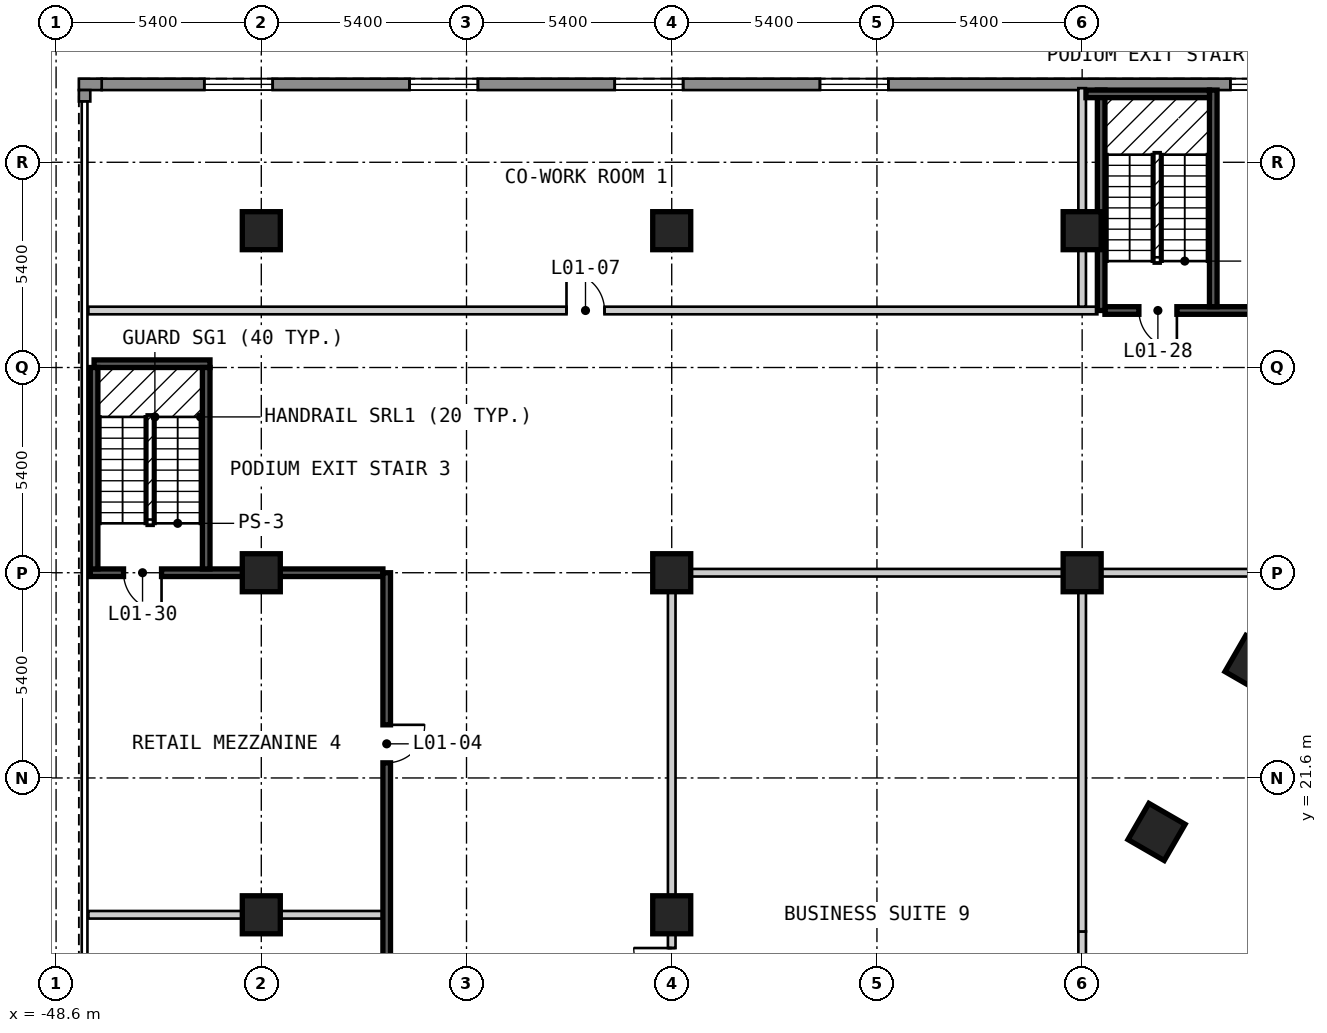
"""IFC4 building model, lengths in metres.
Left out: names, types, materials, properties, quantities, classifications, styles, units other than length and angle.
Written with IfcOpenShell. Run it as: python <this file> out.ifc"""

import sys

from ifc_helpers import new_model, si_unit, direction, frame, frame_2d, origin, origin_2d, place, context, subcontext, project, spatial, rectangle, extrude, element, fill, save


model = new_model("IFC4")
c1 = context("Model", 3, precision=1e-05, world=origin(), true_north=direction((0.0, 1.0)))
c2 = subcontext(c1, "Body", "Model", "MODEL_VIEW")
j1 = project(units=[si_unit("LENGTHUNIT", "METRE"), si_unit("PLANEANGLEUNIT", "RADIAN")], contexts=[c1])
p1 = place(None, origin())
s1 = spatial("IfcSite", under=j1, at=p1, CompositionType="ELEMENT")
p2 = place(p1, origin())
s2 = spatial("IfcBuilding", under=s1, at=p2, CompositionType="ELEMENT")
p3 = place(p2, frame((0.0, 0.0, 5.0)))
s3 = spatial("IfcBuildingStorey", under=s2, at=p3, CompositionType="ELEMENT", Elevation=5.0)
for number, where, z_axis, x_axis in (
    (1, (-17.09, 24.6, 0.0), (0.0, 0.0, 1.0), (-0.5, -0.866, 0.0)),
    (2, (-19.642, 20.18, 0.0), (0.0, 0.0, 1.0), (-0.5, -0.866, 0.0)),
):
    element("IfcColumn", number, at=place(p3, frame(where, z_axis=z_axis, x_axis=x_axis)), inside=s3, PredefinedType="COLUMN", context=c2, shape_type="SweptSolid", body=[
        extrude(rectangle(XDim=1.1, YDim=1.1, at=origin_2d()), origin(), (0.0, 0.0, 1.0), 4.0),
    ])
for number, where, z_axis, x_axis in (
    (3, (-43.2, 18.0, 0.0), (0.0, 0.0, 1.0), (1.0, 0.0, 0.0)),
    (4, (-43.2, 27.0, 0.0), (0.0, 0.0, 1.0), (1.0, 0.0, 0.0)),
    (5, (-43.2, 36.0, 0.0), (0.0, 0.0, 1.0), (1.0, 0.0, 0.0)),
    (6, (-32.4, 18.0, 0.0), (0.0, 0.0, 1.0), (1.0, 0.0, 0.0)),
    (7, (-32.4, 27.0, 0.0), (0.0, 0.0, 1.0), (1.0, 0.0, 0.0)),
    (8, (-32.4, 36.0, 0.0), (0.0, 0.0, 1.0), (1.0, 0.0, 0.0)),
    (9, (-21.6, 27.0, 0.0), (0.0, 0.0, 1.0), (1.0, 0.0, 0.0)),
    (10, (-21.6, 36.0, 0.0), (0.0, 0.0, 1.0), (1.0, 0.0, 0.0)),
):
    element("IfcColumn", number, at=place(p3, frame(where, z_axis=z_axis, x_axis=x_axis)), inside=s3, PredefinedType="COLUMN", context=c2, shape_type="SweptSolid", body=[
        extrude(rectangle(XDim=1.0, YDim=1.0, at=origin_2d()), origin(), (0.0, 0.0, 1.0), 4.0),
    ])
p4 = place(p3, frame((47.4, 39.85, 0.0), z_axis=(0.0, 0.0, 1.0), x_axis=(-1.0, 0.0, 0.0)))
e11 = element("IfcWall", 11, at=p4, inside=s3, PredefinedType="SOLIDWALL", context=c2, shape_type="SweptSolid", body=[
    extrude(rectangle(XDim=94.8, YDim=0.3, at=frame_2d((47.4, 0.0))), origin(), (0.0, 0.0, 1.0), 3.5),
])
p5 = place(p4, frame((3.9, 0.0, 0.9)))
e12 = element("IfcOpeningElement", 12, at=p5, cuts=e11, PredefinedType="OPENING", context=c2, shape_type="SweptSolid", body=[
    extrude(rectangle(XDim=1.8, YDim=2.4, at=frame_2d((0.9, 1.2))), frame((0.0, 0.16, 0.0), z_axis=(0.0, -1.0, 0.0), x_axis=(1.0, 0.0, 0.0)), (0.0, 0.0, 1.0), 0.32),
])
p6 = place(p4, frame((9.3, 0.0, 0.9)))
e13 = element("IfcOpeningElement", 13, at=p6, cuts=e11, PredefinedType="OPENING", context=c2, shape_type="SweptSolid", body=[
    extrude(rectangle(XDim=1.8, YDim=2.4, at=frame_2d((0.9, 1.2))), frame((0.0, 0.16, 0.0), z_axis=(0.0, -1.0, 0.0), x_axis=(1.0, 0.0, 0.0)), (0.0, 0.0, 1.0), 0.32),
])
p7 = place(p4, frame((14.7, 0.0, 0.9)))
e14 = element("IfcOpeningElement", 14, at=p7, cuts=e11, PredefinedType="OPENING", context=c2, shape_type="SweptSolid", body=[
    extrude(rectangle(XDim=1.8, YDim=2.4, at=frame_2d((0.9, 1.2))), frame((0.0, 0.16, 0.0), z_axis=(0.0, -1.0, 0.0), x_axis=(1.0, 0.0, 0.0)), (0.0, 0.0, 1.0), 0.32),
])
p8 = place(p4, frame((20.1, 0.0, 0.9)))
e15 = element("IfcOpeningElement", 15, at=p8, cuts=e11, PredefinedType="OPENING", context=c2, shape_type="SweptSolid", body=[
    extrude(rectangle(XDim=1.8, YDim=2.4, at=frame_2d((0.9, 1.2))), frame((0.0, 0.16, 0.0), z_axis=(0.0, -1.0, 0.0), x_axis=(1.0, 0.0, 0.0)), (0.0, 0.0, 1.0), 0.32),
])
p9 = place(p4, frame((30.9, 0.0, 0.9)))
e16 = element("IfcOpeningElement", 16, at=p9, cuts=e11, PredefinedType="OPENING", context=c2, shape_type="SweptSolid", body=[
    extrude(rectangle(XDim=1.8, YDim=2.4, at=frame_2d((0.9, 1.2))), frame((0.0, 0.16, 0.0), z_axis=(0.0, -1.0, 0.0), x_axis=(1.0, 0.0, 0.0)), (0.0, 0.0, 1.0), 0.32),
])
p10 = place(p4, frame((36.3, 0.0, 0.9)))
e17 = element("IfcOpeningElement", 17, at=p10, cuts=e11, PredefinedType="OPENING", context=c2, shape_type="SweptSolid", body=[
    extrude(rectangle(XDim=1.8, YDim=2.4, at=frame_2d((0.9, 1.2))), frame((0.0, 0.16, 0.0), z_axis=(0.0, -1.0, 0.0), x_axis=(1.0, 0.0, 0.0)), (0.0, 0.0, 1.0), 0.32),
])
p11 = place(p4, frame((41.7, 0.0, 0.9)))
e18 = element("IfcOpeningElement", 18, at=p11, cuts=e11, PredefinedType="OPENING", context=c2, shape_type="SweptSolid", body=[
    extrude(rectangle(XDim=1.8, YDim=2.4, at=frame_2d((0.9, 1.2))), frame((0.0, 0.16, 0.0), z_axis=(0.0, -1.0, 0.0), x_axis=(1.0, 0.0, 0.0)), (0.0, 0.0, 1.0), 0.32),
])
p12 = place(p4, frame((47.1, 0.0, 0.9)))
e19 = element("IfcOpeningElement", 19, at=p12, cuts=e11, PredefinedType="OPENING", context=c2, shape_type="SweptSolid", body=[
    extrude(rectangle(XDim=1.8, YDim=2.4, at=frame_2d((0.9, 1.2))), frame((0.0, 0.16, 0.0), z_axis=(0.0, -1.0, 0.0), x_axis=(1.0, 0.0, 0.0)), (0.0, 0.0, 1.0), 0.32),
])
p13 = place(p4, frame((52.5, 0.0, 0.9)))
e20 = element("IfcOpeningElement", 20, at=p13, cuts=e11, PredefinedType="OPENING", context=c2, shape_type="SweptSolid", body=[
    extrude(rectangle(XDim=1.8, YDim=2.4, at=frame_2d((0.9, 1.2))), frame((0.0, 0.16, 0.0), z_axis=(0.0, -1.0, 0.0), x_axis=(1.0, 0.0, 0.0)), (0.0, 0.0, 1.0), 0.32),
])
p14 = place(p4, frame((57.9, 0.0, 0.9)))
e21 = element("IfcOpeningElement", 21, at=p14, cuts=e11, PredefinedType="OPENING", context=c2, shape_type="SweptSolid", body=[
    extrude(rectangle(XDim=1.8, YDim=2.4, at=frame_2d((0.9, 1.2))), frame((0.0, 0.16, 0.0), z_axis=(0.0, -1.0, 0.0), x_axis=(1.0, 0.0, 0.0)), (0.0, 0.0, 1.0), 0.32),
])
p15 = place(p4, frame((63.3, 0.0, 0.9)))
e22 = element("IfcOpeningElement", 22, at=p15, cuts=e11, PredefinedType="OPENING", context=c2, shape_type="SweptSolid", body=[
    extrude(rectangle(XDim=1.8, YDim=2.4, at=frame_2d((0.9, 1.2))), frame((0.0, 0.16, 0.0), z_axis=(0.0, -1.0, 0.0), x_axis=(1.0, 0.0, 0.0)), (0.0, 0.0, 1.0), 0.32),
])
p16 = place(p4, frame((74.1, 0.0, 0.9)))
e23 = element("IfcOpeningElement", 23, at=p16, cuts=e11, PredefinedType="OPENING", context=c2, shape_type="SweptSolid", body=[
    extrude(rectangle(XDim=1.8, YDim=2.4, at=frame_2d((0.9, 1.2))), frame((0.0, 0.16, 0.0), z_axis=(0.0, -1.0, 0.0), x_axis=(1.0, 0.0, 0.0)), (0.0, 0.0, 1.0), 0.32),
])
p17 = place(p4, frame((79.5, 0.0, 0.9)))
e24 = element("IfcOpeningElement", 24, at=p17, cuts=e11, PredefinedType="OPENING", context=c2, shape_type="SweptSolid", body=[
    extrude(rectangle(XDim=1.8, YDim=2.4, at=frame_2d((0.9, 1.2))), frame((0.0, 0.16, 0.0), z_axis=(0.0, -1.0, 0.0), x_axis=(1.0, 0.0, 0.0)), (0.0, 0.0, 1.0), 0.32),
])
p18 = place(p4, frame((84.9, 0.0, 0.9)))
e25 = element("IfcOpeningElement", 25, at=p18, cuts=e11, PredefinedType="OPENING", context=c2, shape_type="SweptSolid", body=[
    extrude(rectangle(XDim=1.8, YDim=2.4, at=frame_2d((0.9, 1.2))), frame((0.0, 0.16, 0.0), z_axis=(0.0, -1.0, 0.0), x_axis=(1.0, 0.0, 0.0)), (0.0, 0.0, 1.0), 0.32),
])
p19 = place(p4, frame((90.3, 0.0, 0.9)))
e26 = element("IfcOpeningElement", 26, at=p19, cuts=e11, PredefinedType="OPENING", context=c2, shape_type="SweptSolid", body=[
    extrude(rectangle(XDim=1.8, YDim=2.4, at=frame_2d((0.9, 1.2))), frame((0.0, 0.16, 0.0), z_axis=(0.0, -1.0, 0.0), x_axis=(1.0, 0.0, 0.0)), (0.0, 0.0, 1.0), 0.32),
])
p20 = place(p3, frame((-47.4, 39.85, 0.0), z_axis=(0.0, 0.0, 1.0), x_axis=(-1.0, 0.0, 0.0)))
e27 = element("IfcWall", 27, at=p20, inside=s3, PredefinedType="SOLIDWALL", context=c2, shape_type="SweptSolid", body=[
    extrude(rectangle(XDim=0.6, YDim=0.3, at=frame_2d((0.3, 0.0))), origin(), (0.0, 0.0, 1.0), 3.5),
])
p21 = place(p3, frame((-47.85, 39.7, 0.0), z_axis=(0.0, 0.0, 1.0), x_axis=(0.0, -1.0, 0.0)))
e28 = element("IfcWall", 28, at=p21, inside=s3, PredefinedType="SOLIDWALL", context=c2, shape_type="SweptSolid", body=[
    extrude(rectangle(XDim=0.3, YDim=0.3, at=frame_2d((0.15, 0.0))), origin(), (0.0, 0.0, 1.0), 3.5),
])
p22 = place(p3, frame((-47.75, 18.0, 0.0), z_axis=(0.0, 0.0, 1.0), x_axis=(1.0, 0.0, 0.0)))
e29 = element("IfcWall", 29, at=p22, inside=s3, PredefinedType="PARTITIONING", context=c2, shape_type="SweptSolid", body=[
    extrude(rectangle(XDim=7.75, YDim=0.2, at=frame_2d((3.875, 0.0))), origin(), (0.0, 0.0, 1.0), 3.5),
])
p23 = place(p3, frame((-47.7, 27.0, 0.0), z_axis=(0.0, 0.0, 1.0), x_axis=(1.0, 0.0, 0.0)))
e30 = element("IfcWall", 30, at=p23, inside=s3, PredefinedType="SOLIDWALL", context=c2, shape_type="SweptSolid", body=[
    extrude(rectangle(XDim=7.7, YDim=0.2, at=frame_2d((3.85, 0.0))), origin(), (0.0, 0.0, 1.0), 3.5),
])
p24 = place(p23, frame((0.875, 0.0, 0.0)))
e31 = element("IfcOpeningElement", 31, at=p24, cuts=e30, PredefinedType="OPENING", context=c2, shape_type="SweptSolid", body=[
    extrude(rectangle(XDim=1.0, YDim=2.1, at=frame_2d((0.5, 1.05))), frame((0.0, 0.11, 0.0), z_axis=(0.0, -1.0, 0.0), x_axis=(1.0, 0.0, 0.0)), (0.0, 0.0, 1.0), 0.22),
])
p25 = place(p3, frame((-32.4, 27.0, 0.0), z_axis=(0.0, 0.0, 1.0), x_axis=(1.0, 0.0, 0.0)))
e32 = element("IfcWall", 32, at=p25, inside=s3, PredefinedType="PARTITIONING", context=c2, shape_type="SweptSolid", body=[
    extrude(rectangle(XDim=18.793, YDim=0.2, at=frame_2d((9.396, 0.0))), origin(), (0.0, 0.0, 1.0), 3.5),
])
p26 = place(p3, frame((-47.6, 32.5, 0.0), z_axis=(0.0, 0.0, 1.0), x_axis=(1.0, 0.0, 0.0)))
e33 = element("IfcWall", 33, at=p26, inside=s3, PredefinedType="SOLIDWALL", context=c2, shape_type="SweptSolid", body=[
    extrude(rectangle(XDim=3.05, YDim=0.2, at=frame_2d((1.525, 0.0))), origin(), (0.0, 0.0, 1.0), 3.5),
])
p27 = place(p3, frame((-47.75, 33.9, 0.0), z_axis=(0.0, 0.0, 1.0), x_axis=(1.0, 0.0, 0.0)))
e34 = element("IfcWall", 34, at=p27, inside=s3, PredefinedType="PARTITIONING", context=c2, shape_type="SweptSolid", body=[
    extrude(rectangle(XDim=26.55, YDim=0.2, at=frame_2d((13.275, 0.0))), origin(), (0.0, 0.0, 1.0), 3.5),
])
p28 = place(p27, frame((12.581, 0.0, 0.0)))
e35 = element("IfcOpeningElement", 35, at=p28, cuts=e34, PredefinedType="OPENING", context=c2, shape_type="SweptSolid", body=[
    extrude(rectangle(XDim=1.0, YDim=2.1, at=frame_2d((0.5, 1.05))), frame((0.0, 0.11, 0.0), z_axis=(0.0, -1.0, 0.0), x_axis=(1.0, 0.0, 0.0)), (0.0, 0.0, 1.0), 0.22),
])
p29 = place(p3, frame((-21.0, 33.9, 0.0), z_axis=(0.0, 0.0, 1.0), x_axis=(1.0, 0.0, 0.0)))
e36 = element("IfcWall", 36, at=p29, inside=s3, PredefinedType="SOLIDWALL", context=c2, shape_type="SweptSolid", body=[
    extrude(rectangle(XDim=42.0, YDim=0.2, at=frame_2d((21.0, 0.0))), origin(), (0.0, 0.0, 1.0), 3.5),
])
p30 = place(p29, frame((7.6, 0.0, 0.0)))
e37 = element("IfcOpeningElement", 37, at=p30, cuts=e36, PredefinedType="OPENING", context=c2, shape_type="SweptSolid", body=[
    extrude(rectangle(XDim=1.0, YDim=2.1, at=frame_2d((0.5, 1.05))), frame((0.0, 0.11, 0.0), z_axis=(0.0, -1.0, 0.0), x_axis=(1.0, 0.0, 0.0)), (0.0, 0.0, 1.0), 0.22),
])
p31 = place(p29, frame((25.85, 0.0, 0.0)))
e38 = element("IfcOpeningElement", 38, at=p31, cuts=e36, PredefinedType="OPENING", context=c2, shape_type="SweptSolid", body=[
    extrude(rectangle(XDim=1.0, YDim=2.1, at=frame_2d((0.5, 1.05))), frame((0.0, 0.11, 0.0), z_axis=(0.0, -1.0, 0.0), x_axis=(1.0, 0.0, 0.0)), (0.0, 0.0, 1.0), 0.22),
])
p32 = place(p29, frame((0.893, 0.0, 0.0)))
e39 = element("IfcOpeningElement", 39, at=p32, cuts=e36, PredefinedType="OPENING", context=c2, shape_type="SweptSolid", body=[
    extrude(rectangle(XDim=1.0, YDim=2.1, at=frame_2d((0.5, 1.05))), frame((0.0, 0.11, 0.0), z_axis=(0.0, -1.0, 0.0), x_axis=(1.0, 0.0, 0.0)), (0.0, 0.0, 1.0), 0.22),
])
p33 = place(p29, frame((40.107, 0.0, 0.0)))
e40 = element("IfcOpeningElement", 40, at=p33, cuts=e36, PredefinedType="OPENING", context=c2, shape_type="SweptSolid", body=[
    extrude(rectangle(XDim=1.0, YDim=2.1, at=frame_2d((0.5, 1.05))), frame((0.0, 0.11, 0.0), z_axis=(0.0, -1.0, 0.0), x_axis=(1.0, 0.0, 0.0)), (0.0, 0.0, 1.0), 0.22),
])
p34 = place(p3, frame((-44.65, 27.1, 0.0), z_axis=(0.0, 0.0, 1.0), x_axis=(0.0, 1.0, 0.0)))
e41 = element("IfcWall", 41, at=p34, inside=s3, PredefinedType="SOLIDWALL", context=c2, shape_type="SweptSolid", body=[
    extrude(rectangle(XDim=5.3, YDim=0.2, at=frame_2d((2.65, 0.0))), origin(), (0.0, 0.0, 1.0), 3.5),
])
p35 = place(p3, frame((-39.9, -6.3, 0.0), z_axis=(0.0, 0.0, 1.0), x_axis=(0.0, 1.0, 0.0)))
e42 = element("IfcWall", 42, at=p35, inside=s3, PredefinedType="SOLIDWALL", context=c2, shape_type="SweptSolid", body=[
    extrude(rectangle(XDim=33.3, YDim=0.2, at=frame_2d((16.65, 0.0))), origin(), (0.0, 0.0, 1.0), 3.5),
])
p36 = place(p35, frame((10.302, 0.0, 0.0)))
e43 = element("IfcOpeningElement", 43, at=p36, cuts=e42, PredefinedType="OPENING", context=c2, shape_type="SweptSolid", body=[
    extrude(rectangle(XDim=1.0, YDim=2.1, at=frame_2d((0.5, 1.05))), frame((0.0, 0.11, 0.0), z_axis=(0.0, -1.0, 0.0), x_axis=(1.0, 0.0, 0.0)), (0.0, 0.0, 1.0), 0.22),
])
p37 = place(p35, frame((28.298, 0.0, 0.0)))
e44 = element("IfcOpeningElement", 44, at=p37, cuts=e42, PredefinedType="OPENING", context=c2, shape_type="SweptSolid", body=[
    extrude(rectangle(XDim=1.0, YDim=2.1, at=frame_2d((0.5, 1.05))), frame((0.0, 0.11, 0.0), z_axis=(0.0, -1.0, 0.0), x_axis=(1.0, 0.0, 0.0)), (0.0, 0.0, 1.0), 0.22),
])
p38 = place(p35, frame((19.3, 0.0, 0.0)))
e45 = element("IfcOpeningElement", 45, at=p38, cuts=e42, PredefinedType="OPENING", context=c2, shape_type="SweptSolid", body=[
    extrude(rectangle(XDim=1.0, YDim=2.1, at=frame_2d((0.5, 1.05))), frame((0.0, 0.11, 0.0), z_axis=(0.0, -1.0, 0.0), x_axis=(1.0, 0.0, 0.0)), (0.0, 0.0, 1.0), 0.22),
])
p39 = place(p35, frame((0.45, 0.0, 0.0)))
e46 = element("IfcOpeningElement", 46, at=p39, cuts=e42, PredefinedType="OPENING", context=c2, shape_type="SweptSolid", body=[
    extrude(rectangle(XDim=1.0, YDim=2.1, at=frame_2d((0.5, 1.05))), frame((0.0, 0.11, 0.0), z_axis=(0.0, -1.0, 0.0), x_axis=(1.0, 0.0, 0.0)), (0.0, 0.0, 1.0), 0.22),
])
p40 = place(p3, frame((-32.4, 9.1, 0.0), z_axis=(0.0, 0.0, 1.0), x_axis=(0.0, 1.0, 0.0)))
e47 = element("IfcWall", 47, at=p40, inside=s3, PredefinedType="PARTITIONING", context=c2, shape_type="SweptSolid", body=[
    extrude(rectangle(XDim=17.8, YDim=0.2, at=frame_2d((8.9, 0.0))), origin(), (0.0, 0.0, 1.0), 3.5),
])
p41 = place(p40, frame((8.025, 0.0, 0.0), z_axis=(0.0, 0.0, 1.0), x_axis=(-1.0, 0.0, 0.0)))
e48 = element("IfcOpeningElement", 48, at=p41, cuts=e47, PredefinedType="OPENING", context=c2, shape_type="SweptSolid", body=[
    extrude(rectangle(XDim=1.0, YDim=2.1, at=frame_2d((0.5, 1.05))), frame((0.0, 0.11, 0.0), z_axis=(0.0, -1.0, 0.0), x_axis=(1.0, 0.0, 0.0)), (0.0, 0.0, 1.0), 0.22),
])
p42 = place(p3, frame((-21.6, 16.015, 0.0), z_axis=(0.0, 0.0, 1.0), x_axis=(0.0, 1.0, 0.0)))
e49 = element("IfcWall", 49, at=p42, inside=s3, PredefinedType="PARTITIONING", context=c2, shape_type="SweptSolid", body=[
    extrude(rectangle(XDim=1.546, YDim=0.2, at=frame_2d((0.773, 0.0))), origin(), (0.0, 0.0, 1.0), 2.77),
])
p43 = place(p3, frame((-21.6, 17.561, 0.0), z_axis=(0.0, 0.0, 1.0), x_axis=(0.0, 1.0, 0.0)))
e50 = element("IfcWall", 50, at=p43, inside=s3, PredefinedType="PARTITIONING", context=c2, shape_type="SweptSolid", body=[
    extrude(rectangle(XDim=9.339, YDim=0.2, at=frame_2d((4.669, 0.0))), origin(), (0.0, 0.0, 1.0), 3.5),
])
p44 = place(p3, frame((-21.6, 34.0, 0.0), z_axis=(0.0, 0.0, 1.0), x_axis=(0.0, 1.0, 0.0)))
e51 = element("IfcWall", 51, at=p44, inside=s3, PredefinedType="PARTITIONING", context=c2, shape_type="SweptSolid", body=[
    extrude(rectangle(XDim=5.75, YDim=0.2, at=frame_2d((2.875, 0.0))), origin(), (0.0, 0.0, 1.0), 3.5),
])
p45 = place(p3, frame((-21.1, 33.9, 0.0), z_axis=(0.0, 0.0, 1.0), x_axis=(0.0, 1.0, 0.0)))
e52 = element("IfcWall", 52, at=p45, inside=s3, PredefinedType="SOLIDWALL", context=c2, shape_type="SweptSolid", body=[
    extrude(rectangle(XDim=5.8, YDim=0.2, at=frame_2d((2.9, 0.0))), origin(), (0.0, 0.0, 1.0), 3.5),
])
p46 = place(p3, frame((-18.15, 34.0, 0.0), z_axis=(0.0, 0.0, 1.0), x_axis=(0.0, 1.0, 0.0)))
e53 = element("IfcWall", 53, at=p46, inside=s3, PredefinedType="SOLIDWALL", context=c2, shape_type="SweptSolid", body=[
    extrude(rectangle(XDim=5.7, YDim=0.2, at=frame_2d((2.85, 0.0))), origin(), (0.0, 0.0, 1.0), 3.5),
])
p47 = place(p3, frame((-21.5, 39.6, 0.0), z_axis=(0.0, 0.0, 1.0), x_axis=(1.0, 0.0, 0.0)))
e54 = element("IfcWall", 54, at=p47, inside=s3, PredefinedType="SOLIDWALL", context=c2, shape_type="SweptSolid", body=[
    extrude(rectangle(XDim=3.25, YDim=0.2, at=frame_2d((1.625, 0.0))), origin(), (0.0, 0.0, 1.0), 3.5),
])
p48 = place(p3, frame((-47.6, 27.1, 0.0), z_axis=(0.0, 0.0, 1.0), x_axis=(0.0, 1.0, 0.0)))
e55 = element("IfcWall", 55, at=p48, inside=s3, PredefinedType="SOLIDWALL", context=c2, shape_type="SweptSolid", body=[
    extrude(rectangle(XDim=5.3, YDim=0.2, at=frame_2d((2.65, 0.0))), origin(), (0.0, 0.0, 1.0), 3.5),
])
p49 = place(p15, origin())
e56 = element("IfcWindow", 56, at=p49, inside=s3, PartitioningType="SINGLE_PANEL", PredefinedType="WINDOW", context=c2, shape_type="SweptSolid", body=[
    extrude(rectangle(XDim=1.8, YDim=2.4, at=frame_2d((0.9, 1.2))), frame((0.0, 0.03, 0.0), z_axis=(0.0, -1.0, 0.0), x_axis=(1.0, 0.0, 0.0)), (0.0, 0.0, 1.0), 0.06),
])
fill(e22, e56)
p50 = place(p16, origin())
e57 = element("IfcWindow", 57, at=p50, inside=s3, PartitioningType="SINGLE_PANEL", PredefinedType="WINDOW", context=c2, shape_type="SweptSolid", body=[
    extrude(rectangle(XDim=1.8, YDim=2.4, at=frame_2d((0.9, 1.2))), frame((0.0, 0.03, 0.0), z_axis=(0.0, -1.0, 0.0), x_axis=(1.0, 0.0, 0.0)), (0.0, 0.0, 1.0), 0.06),
])
fill(e23, e57)
p51 = place(p17, origin())
e58 = element("IfcWindow", 58, at=p51, inside=s3, PartitioningType="SINGLE_PANEL", PredefinedType="WINDOW", context=c2, shape_type="SweptSolid", body=[
    extrude(rectangle(XDim=1.8, YDim=2.4, at=frame_2d((0.9, 1.2))), frame((0.0, 0.03, 0.0), z_axis=(0.0, -1.0, 0.0), x_axis=(1.0, 0.0, 0.0)), (0.0, 0.0, 1.0), 0.06),
])
fill(e24, e58)
p52 = place(p18, origin())
e59 = element("IfcWindow", 59, at=p52, inside=s3, PartitioningType="SINGLE_PANEL", PredefinedType="WINDOW", context=c2, shape_type="SweptSolid", body=[
    extrude(rectangle(XDim=1.8, YDim=2.4, at=frame_2d((0.9, 1.2))), frame((0.0, 0.03, 0.0), z_axis=(0.0, -1.0, 0.0), x_axis=(1.0, 0.0, 0.0)), (0.0, 0.0, 1.0), 0.06),
])
fill(e25, e59)
p53 = place(p19, origin())
e60 = element("IfcWindow", 60, at=p53, inside=s3, PartitioningType="SINGLE_PANEL", PredefinedType="WINDOW", context=c2, shape_type="SweptSolid", body=[
    extrude(rectangle(XDim=1.8, YDim=2.4, at=frame_2d((0.9, 1.2))), frame((0.0, 0.03, 0.0), z_axis=(0.0, -1.0, 0.0), x_axis=(1.0, 0.0, 0.0)), (0.0, 0.0, 1.0), 0.06),
])
fill(e26, e60)
p54 = place(p37, origin())
e61 = element("IfcDoor", 61, at=p54, inside=s3, OperationType="SINGLE_SWING_RIGHT", PredefinedType="DOOR", context=c2, shape_type="SweptSolid", body=[
    extrude(rectangle(XDim=1.0, YDim=2.1, at=frame_2d((0.5, 1.05))), frame((0.0, 0.025, 0.0), z_axis=(0.0, -1.0, 0.0), x_axis=(1.0, 0.0, 0.0)), (0.0, 0.0, 1.0), 0.05),
])
fill(e44, e61)
p55 = place(p28, origin())
e62 = element("IfcDoor", 62, at=p55, inside=s3, OperationType="SINGLE_SWING_LEFT", PredefinedType="DOOR", context=c2, shape_type="SweptSolid", body=[
    extrude(rectangle(XDim=1.0, YDim=2.1, at=frame_2d((0.5, 1.05))), frame((0.0, 0.025, 0.0), z_axis=(0.0, -1.0, 0.0), x_axis=(1.0, 0.0, 0.0)), (0.0, 0.0, 1.0), 0.05),
])
fill(e35, e62)
p56 = place(p41, origin())
e63 = element("IfcDoor", 63, at=p56, inside=s3, OperationType="SINGLE_SWING_LEFT", PredefinedType="DOOR", context=c2, shape_type="SweptSolid", body=[
    extrude(rectangle(XDim=1.0, YDim=2.1, at=frame_2d((0.5, 1.05))), frame((0.0, 0.025, 0.0), z_axis=(0.0, -1.0, 0.0), x_axis=(1.0, 0.0, 0.0)), (0.0, 0.0, 1.0), 0.05),
])
fill(e48, e63)
p57 = place(p32, origin())
e64 = element("IfcDoor", 64, at=p57, inside=s3, OperationType="SINGLE_SWING_RIGHT", PredefinedType="DOOR", context=c2, shape_type="SweptSolid", body=[
    extrude(rectangle(XDim=1.0, YDim=2.1, at=frame_2d((0.5, 1.05))), frame((0.0, 0.025, 0.0), z_axis=(0.0, -1.0, 0.0), x_axis=(1.0, 0.0, 0.0)), (0.0, 0.0, 1.0), 0.05),
])
fill(e39, e64)
p58 = place(p24, origin())
e65 = element("IfcDoor", 65, at=p58, inside=s3, OperationType="SINGLE_SWING_RIGHT", PredefinedType="DOOR", context=c2, shape_type="SweptSolid", body=[
    extrude(rectangle(XDim=1.0, YDim=2.1, at=frame_2d((0.5, 1.05))), frame((0.0, 0.025, 0.0), z_axis=(0.0, -1.0, 0.0), x_axis=(1.0, 0.0, 0.0)), (0.0, 0.0, 1.0), 0.05),
])
fill(e31, e65)
save(model, sys.argv[1])
